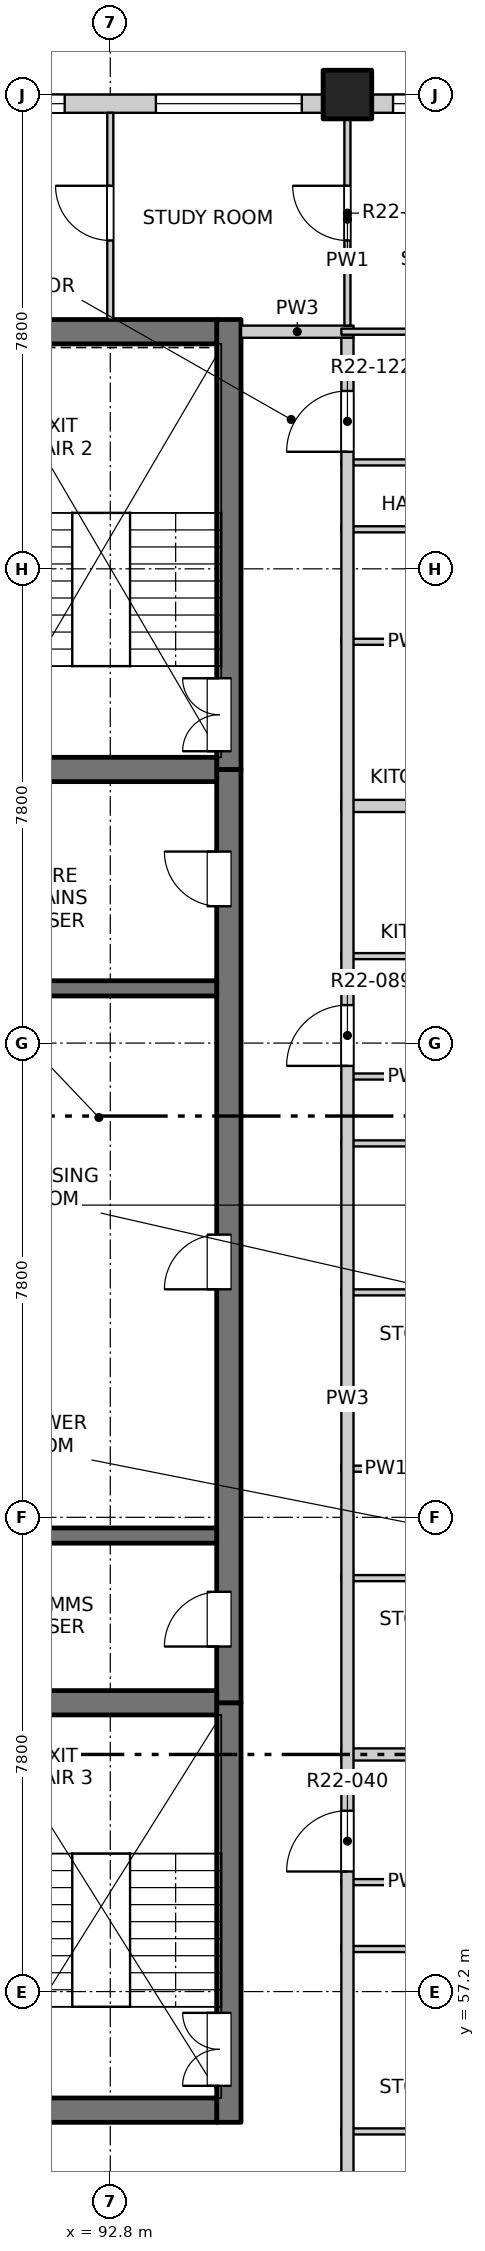
"""IFC4 building model, lengths in metres.
Left out: names, types, materials, properties, quantities, classifications, styles, units other than length and angle.
Written with IfcOpenShell. Run it as: python <this file> out.ifc"""

import sys

from ifc_helpers import new_model, si_unit, direction, frame, frame_2d, origin, origin_2d, place, context, subcontext, project, spatial, rectangle, extrude, element, fill, save


model = new_model("IFC4")
c1 = context("Model", 3, precision=1e-05, world=origin(), true_north=direction((0.0, 1.0)))
c2 = subcontext(c1, "Body", "Model", "MODEL_VIEW")
j1 = project(units=[si_unit("LENGTHUNIT", "METRE"), si_unit("PLANEANGLEUNIT", "RADIAN")], contexts=[c1])
p1 = place(None, origin())
s1 = spatial("IfcSite", under=j1, at=p1, CompositionType="ELEMENT")
p2 = place(p1, origin())
s2 = spatial("IfcBuilding", under=s1, at=p2, CompositionType="ELEMENT")
p3 = place(p2, frame((0.0, 0.0, 231.3)))
s3 = spatial("IfcBuildingStorey", under=s2, at=p3, CompositionType="ELEMENT", Elevation=231.3)
p4 = place(p3, frame((96.7, 88.4, -0.25), z_axis=(0.0, 0.0, 1.0), x_axis=(1.0, 0.0, 0.0)))
e1 = element("IfcColumn", 1, at=p4, inside=s3, PredefinedType="COLUMN", context=c2, shape_type="SweptSolid", body=[
    extrude(rectangle(XDim=0.8, YDim=0.8, at=origin_2d()), origin(), (0.0, 0.0, 1.0), 3.4),
])
p5 = place(p3, frame((94.75, 55.05, -0.25), z_axis=(0.0, 0.0, 1.0), x_axis=(0.0, 1.0, 0.0)))
e2 = element("IfcWall", 2, at=p5, inside=s3, PredefinedType="SOLIDWALL", context=c2, shape_type="SweptSolid", body=[
    extrude(rectangle(XDim=6.9, YDim=0.4, at=frame_2d((3.45, 0.0))), origin(), (0.0, 0.0, 1.0), 3.4),
])
p6 = place(p5, frame((0.6, 0.0, 0.25)))
e3 = element("IfcOpeningElement", 3, at=p6, cuts=e2, PredefinedType="OPENING", context=c2, shape_type="SweptSolid", body=[
    extrude(rectangle(XDim=1.2, YDim=2.1, at=frame_2d((0.6, 1.05))), frame((0.0, 0.21, 0.0), z_axis=(0.0, -1.0, 0.0), x_axis=(1.0, 0.0, 0.0)), (0.0, 0.0, 1.0), 0.42),
])
p7 = place(p3, frame((94.75, 61.95, -0.25), z_axis=(0.0, 0.0, 1.0), x_axis=(0.0, 1.0, 0.0)))
e4 = element("IfcWall", 4, at=p7, inside=s3, PredefinedType="SOLIDWALL", context=c2, shape_type="SweptSolid", body=[
    extrude(rectangle(XDim=15.35, YDim=0.4, at=frame_2d((7.675, 0.0))), origin(), (0.0, 0.0, 1.0), 3.4),
])
p8 = place(p7, frame((0.925, 0.0, 0.25)))
e5 = element("IfcOpeningElement", 5, at=p8, cuts=e4, PredefinedType="OPENING", context=c2, shape_type="SweptSolid", body=[
    extrude(rectangle(XDim=0.9, YDim=2.1, at=frame_2d((0.45, 1.05))), frame((0.0, 0.21, 0.0), z_axis=(0.0, -1.0, 0.0), x_axis=(1.0, 0.0, 0.0)), (0.0, 0.0, 1.0), 0.42),
])
p9 = place(p7, frame((6.8, 0.0, 0.25)))
e6 = element("IfcOpeningElement", 6, at=p9, cuts=e4, PredefinedType="OPENING", context=c2, shape_type="SweptSolid", body=[
    extrude(rectangle(XDim=0.9, YDim=2.1, at=frame_2d((0.45, 1.05))), frame((0.0, 0.21, 0.0), z_axis=(0.0, -1.0, 0.0), x_axis=(1.0, 0.0, 0.0)), (0.0, 0.0, 1.0), 0.42),
])
p10 = place(p7, frame((13.1, 0.0, 0.25)))
e7 = element("IfcOpeningElement", 7, at=p10, cuts=e4, PredefinedType="OPENING", context=c2, shape_type="SweptSolid", body=[
    extrude(rectangle(XDim=0.9, YDim=2.1, at=frame_2d((0.45, 1.05))), frame((0.0, 0.21, 0.0), z_axis=(0.0, -1.0, 0.0), x_axis=(1.0, 0.0, 0.0)), (0.0, 0.0, 1.0), 0.42),
])
p11 = place(p3, frame((94.75, 77.3, -0.25), z_axis=(0.0, 0.0, 1.0), x_axis=(0.0, 1.0, 0.0)))
e8 = element("IfcWall", 8, at=p11, inside=s3, PredefinedType="SOLIDWALL", context=c2, shape_type="SweptSolid", body=[
    extrude(rectangle(XDim=7.4, YDim=0.4, at=frame_2d((3.7, 0.0))), origin(), (0.0, 0.0, 1.0), 3.4),
])
p12 = place(p11, frame((0.3, 0.0, 0.25)))
e9 = element("IfcOpeningElement", 9, at=p12, cuts=e8, PredefinedType="OPENING", context=c2, shape_type="SweptSolid", body=[
    extrude(rectangle(XDim=1.2, YDim=2.1, at=frame_2d((0.6, 1.05))), frame((0.0, 0.21, 0.0), z_axis=(0.0, -1.0, 0.0), x_axis=(1.0, 0.0, 0.0)), (0.0, 0.0, 1.0), 0.42),
])
p13 = place(p3, frame((75.45, 55.25, -0.25), z_axis=(0.0, 0.0, 1.0), x_axis=(1.0, 0.0, 0.0)))
e10 = element("IfcWall", 10, at=p13, inside=s3, PredefinedType="SOLIDWALL", context=c2, shape_type="SweptSolid", body=[
    extrude(rectangle(XDim=19.1, YDim=0.4, at=frame_2d((9.55, 0.0))), origin(), (0.0, 0.0, 1.0), 3.4),
])
p14 = place(p13, frame((8.8, 0.0, 0.25)))
e11 = element("IfcOpeningElement", 11, at=p14, cuts=e10, PredefinedType="OPENING", context=c2, shape_type="SweptSolid", body=[
    extrude(rectangle(XDim=1.5, YDim=2.1, at=frame_2d((0.75, 1.05))), frame((0.0, 0.21, 0.0), z_axis=(0.0, -1.0, 0.0), x_axis=(1.0, 0.0, 0.0)), (0.0, 0.0, 1.0), 0.42),
])
p15 = place(p3, frame((75.45, 84.5, -0.25), z_axis=(0.0, 0.0, 1.0), x_axis=(1.0, 0.0, 0.0)))
e12 = element("IfcWall", 12, at=p15, inside=s3, PredefinedType="SOLIDWALL", context=c2, shape_type="SweptSolid", body=[
    extrude(rectangle(XDim=19.1, YDim=0.4, at=frame_2d((9.55, 0.0))), origin(), (0.0, 0.0, 1.0), 3.4),
])
p16 = place(p3, frame((90.675, 61.95, -0.25), z_axis=(0.0, 0.0, 1.0), x_axis=(1.0, 0.0, 0.0)))
e13 = element("IfcWall", 13, at=p16, inside=s3, PredefinedType="SOLIDWALL", context=c2, shape_type="SweptSolid", body=[
    extrude(rectangle(XDim=3.875, YDim=0.4, at=frame_2d((1.938, 0.0))), origin(), (0.0, 0.0, 1.0), 3.4),
])
for number, where, z_axis, x_axis in (
    (14, (90.675, 64.7, -0.25), (0.0, 0.0, 1.0), (1.0, 0.0, 0.0)),
    (15, (90.675, 73.7, -0.25), (0.0, 0.0, 1.0), (1.0, 0.0, 0.0)),
):
    element("IfcWall", number, at=place(p3, frame(where, z_axis=z_axis, x_axis=x_axis)), inside=s3, PredefinedType="SOLIDWALL", context=c2, shape_type="SweptSolid", body=[
        extrude(rectangle(XDim=3.875, YDim=0.25, at=frame_2d((1.938, 0.0))), origin(), (0.0, 0.0, 1.0), 3.4),
    ])
p17 = place(p3, frame((90.675, 77.3, -0.25), z_axis=(0.0, 0.0, 1.0), x_axis=(1.0, 0.0, 0.0)))
e16 = element("IfcWall", 16, at=p17, inside=s3, PredefinedType="SOLIDWALL", context=c2, shape_type="SweptSolid", body=[
    extrude(rectangle(XDim=3.875, YDim=0.4, at=frame_2d((1.938, 0.0))), origin(), (0.0, 0.0, 1.0), 3.4),
])
p18 = place(p3, frame((73.7, 88.25, 0.0), z_axis=(0.0, 0.0, 1.0), x_axis=(1.0, 0.0, 0.0)))
e17 = element("IfcWall", 17, at=p18, inside=s3, PredefinedType="SOLIDWALL", context=c2, shape_type="SweptSolid", body=[
    extrude(rectangle(XDim=22.6, YDim=0.3, at=frame_2d((11.3, 0.0))), origin(), (0.0, 0.0, 1.0), 2.7),
])
p19 = place(p18, frame((0.35, 0.0, 0.9)))
e18 = element("IfcOpeningElement", 18, at=p19, cuts=e17, PredefinedType="OPENING", context=c2, shape_type="SweptSolid", body=[
    extrude(rectangle(XDim=2.4, YDim=1.8, at=frame_2d((1.2, 0.9))), frame((0.0, 0.16, 0.0), z_axis=(0.0, -1.0, 0.0), x_axis=(1.0, 0.0, 0.0)), (0.0, 0.0, 1.0), 0.32),
])
p20 = place(p18, frame((4.25, 0.0, 0.9)))
e19 = element("IfcOpeningElement", 19, at=p20, cuts=e17, PredefinedType="OPENING", context=c2, shape_type="SweptSolid", body=[
    extrude(rectangle(XDim=2.4, YDim=1.8, at=frame_2d((1.2, 0.9))), frame((0.0, 0.16, 0.0), z_axis=(0.0, -1.0, 0.0), x_axis=(1.0, 0.0, 0.0)), (0.0, 0.0, 1.0), 0.32),
])
p21 = place(p18, frame((8.15, 0.0, 0.9)))
e20 = element("IfcOpeningElement", 20, at=p21, cuts=e17, PredefinedType="OPENING", context=c2, shape_type="SweptSolid", body=[
    extrude(rectangle(XDim=2.4, YDim=1.8, at=frame_2d((1.2, 0.9))), frame((0.0, 0.16, 0.0), z_axis=(0.0, -1.0, 0.0), x_axis=(1.0, 0.0, 0.0)), (0.0, 0.0, 1.0), 0.32),
])
p22 = place(p18, frame((12.05, 0.0, 0.9)))
e21 = element("IfcOpeningElement", 21, at=p22, cuts=e17, PredefinedType="OPENING", context=c2, shape_type="SweptSolid", body=[
    extrude(rectangle(XDim=2.4, YDim=1.8, at=frame_2d((1.2, 0.9))), frame((0.0, 0.16, 0.0), z_axis=(0.0, -1.0, 0.0), x_axis=(1.0, 0.0, 0.0)), (0.0, 0.0, 1.0), 0.32),
])
p23 = place(p18, frame((15.95, 0.0, 0.9)))
e22 = element("IfcOpeningElement", 22, at=p23, cuts=e17, PredefinedType="OPENING", context=c2, shape_type="SweptSolid", body=[
    extrude(rectangle(XDim=2.4, YDim=1.8, at=frame_2d((1.2, 0.9))), frame((0.0, 0.16, 0.0), z_axis=(0.0, -1.0, 0.0), x_axis=(1.0, 0.0, 0.0)), (0.0, 0.0, 1.0), 0.32),
])
p24 = place(p18, frame((19.85, 0.0, 0.9)))
e23 = element("IfcOpeningElement", 23, at=p24, cuts=e17, PredefinedType="OPENING", context=c2, shape_type="SweptSolid", body=[
    extrude(rectangle(XDim=2.4, YDim=1.8, at=frame_2d((1.2, 0.9))), frame((0.0, 0.16, 0.0), z_axis=(0.0, -1.0, 0.0), x_axis=(1.0, 0.0, 0.0)), (0.0, 0.0, 1.0), 0.32),
])
p25 = place(p3, frame((97.1, 88.25, 0.0), z_axis=(0.0, 0.0, 1.0), x_axis=(1.0, 0.0, 0.0)))
e24 = element("IfcWall", 24, at=p25, inside=s3, PredefinedType="SOLIDWALL", context=c2, shape_type="SweptSolid", body=[
    extrude(rectangle(XDim=7.4, YDim=0.3, at=frame_2d((3.7, 0.0))), origin(), (0.0, 0.0, 1.0), 2.7),
])
p26 = place(p25, frame((0.35, 0.0, 0.9)))
e25 = element("IfcOpeningElement", 25, at=p26, cuts=e24, PredefinedType="OPENING", context=c2, shape_type="SweptSolid", body=[
    extrude(rectangle(XDim=2.4, YDim=1.8, at=frame_2d((1.2, 0.9))), frame((0.0, 0.16, 0.0), z_axis=(0.0, -1.0, 0.0), x_axis=(1.0, 0.0, 0.0)), (0.0, 0.0, 1.0), 0.32),
])
p27 = place(p25, frame((4.25, 0.0, 0.9)))
e26 = element("IfcOpeningElement", 26, at=p27, cuts=e24, PredefinedType="OPENING", context=c2, shape_type="SweptSolid", body=[
    extrude(rectangle(XDim=2.4, YDim=1.8, at=frame_2d((1.2, 0.9))), frame((0.0, 0.16, 0.0), z_axis=(0.0, -1.0, 0.0), x_axis=(1.0, 0.0, 0.0)), (0.0, 0.0, 1.0), 0.32),
])
for number, where, z_axis, x_axis in (
    (27, (96.6, 54.9, 0.0), (0.0, 0.0, 1.0), (1.0, 0.0, 0.0)),
    (28, (96.6, 57.9, 0.0), (0.0, 0.0, 1.0), (1.0, 0.0, 0.0)),
    (29, (96.6, 59.0, 0.0), (0.0, 0.0, 1.0), (1.0, 0.0, 0.0)),
):
    element("IfcWall", number, at=place(p3, frame(where, z_axis=z_axis, x_axis=x_axis)), inside=s3, PredefinedType="PARTITIONING", context=c2, shape_type="SweptSolid", body=[
        extrude(rectangle(XDim=2.22, YDim=0.1, at=frame_2d((1.11, 0.0))), origin(), (0.0, 0.0, 1.0), 3.15),
    ])
p28 = place(p3, frame((96.6, 61.1, 0.0), z_axis=(0.0, 0.0, 1.0), x_axis=(1.0, 0.0, 0.0)))
e30 = element("IfcWall", 30, at=p28, inside=s3, PredefinedType="PARTITIONING", context=c2, shape_type="SweptSolid", body=[
    extrude(rectangle(XDim=11.5, YDim=0.2, at=frame_2d((5.75, 0.0))), origin(), (0.0, 0.0, 1.0), 2.55),
])
for number, where, z_axis, x_axis in (
    (31, (96.6, 64.0, 0.0), (0.0, 0.0, 1.0), (1.0, 0.0, 0.0)),
    (32, (96.6, 65.8, 0.0), (0.0, 0.0, 1.0), (1.0, 0.0, 0.0)),
):
    element("IfcWall", number, at=place(p3, frame(where, z_axis=z_axis, x_axis=x_axis)), inside=s3, PredefinedType="PARTITIONING", context=c2, shape_type="SweptSolid", body=[
        extrude(rectangle(XDim=2.22, YDim=0.1, at=frame_2d((1.11, 0.0))), origin(), (0.0, 0.0, 1.0), 3.15),
    ])
p29 = place(p3, frame((96.6, 68.7, 0.0), z_axis=(0.0, 0.0, 1.0), x_axis=(1.0, 0.0, 0.0)))
e33 = element("IfcWall", 33, at=p29, inside=s3, PredefinedType="PARTITIONING", context=c2, shape_type="SweptSolid", body=[
    extrude(rectangle(XDim=2.22, YDim=0.1, at=frame_2d((1.11, 0.0))), origin(), (0.0, 0.0, 1.0), 2.55),
])
for number, where, z_axis, x_axis in (
    (34, (96.6, 71.15, 0.0), (0.0, 0.0, 1.0), (1.0, 0.0, 0.0)),
    (35, (96.6, 72.25, 0.0), (0.0, 0.0, 1.0), (1.0, 0.0, 0.0)),
    (36, (96.6, 74.23, 0.0), (0.0, 0.0, 1.0), (1.0, 0.0, 0.0)),
):
    element("IfcWall", number, at=place(p3, frame(where, z_axis=z_axis, x_axis=x_axis)), inside=s3, PredefinedType="PARTITIONING", context=c2, shape_type="SweptSolid", body=[
        extrude(rectangle(XDim=2.22, YDim=0.1, at=frame_2d((1.11, 0.0))), origin(), (0.0, 0.0, 1.0), 3.15),
    ])
p30 = place(p3, frame((96.6, 76.7, 0.0), z_axis=(0.0, 0.0, 1.0), x_axis=(1.0, 0.0, 0.0)))
e37 = element("IfcWall", 37, at=p30, inside=s3, PredefinedType="PARTITIONING", context=c2, shape_type="SweptSolid", body=[
    extrude(rectangle(XDim=11.5, YDim=0.2, at=frame_2d((5.75, 0.0))), origin(), (0.0, 0.0, 1.0), 2.55),
])
for number, where, z_axis, x_axis in (
    (38, (96.6, 79.4, 0.0), (0.0, 0.0, 1.0), (1.0, 0.0, 0.0)),
    (39, (96.6, 81.25, 0.0), (0.0, 0.0, 1.0), (1.0, 0.0, 0.0)),
    (40, (96.6, 82.35, 0.0), (0.0, 0.0, 1.0), (1.0, 0.0, 0.0)),
):
    element("IfcWall", number, at=place(p3, frame(where, z_axis=z_axis, x_axis=x_axis)), inside=s3, PredefinedType="PARTITIONING", context=c2, shape_type="SweptSolid", body=[
        extrude(rectangle(XDim=2.22, YDim=0.1, at=frame_2d((1.11, 0.0))), origin(), (0.0, 0.0, 1.0), 3.15),
    ])
p31 = place(p3, frame((94.95, 84.5, 0.0), z_axis=(0.0, 0.0, 1.0), x_axis=(1.0, 0.0, 0.0)))
e41 = element("IfcWall", 41, at=p31, inside=s3, PredefinedType="PARTITIONING", context=c2, shape_type="SweptSolid", body=[
    extrude(rectangle(XDim=1.85, YDim=0.2, at=frame_2d((0.925, 0.0))), origin(), (0.0, 0.0, 1.0), 3.15),
])
p32 = place(p3, frame((96.6, 84.5, 0.0), z_axis=(0.0, 0.0, 1.0), x_axis=(1.0, 0.0, 0.0)))
e42 = element("IfcWall", 42, at=p32, inside=s3, PredefinedType="PARTITIONING", context=c2, shape_type="SweptSolid", body=[
    extrude(rectangle(XDim=11.5, YDim=0.1, at=frame_2d((5.75, 0.0))), origin(), (0.0, 0.0, 1.0), 3.15),
])
p33 = place(p32, frame((2.635, 0.0, 0.0)))
e43 = element("IfcOpeningElement", 43, at=p33, cuts=e42, PredefinedType="OPENING", context=c2, shape_type="SweptSolid", body=[
    extrude(rectangle(XDim=0.9, YDim=2.1, at=frame_2d((0.45, 1.05))), frame((0.0, 0.06, 0.0), z_axis=(0.0, -1.0, 0.0), x_axis=(1.0, 0.0, 0.0)), (0.0, 0.0, 1.0), 0.12),
])
p34 = place(p3, frame((92.8, 84.7, 0.0), z_axis=(0.0, 0.0, 1.0), x_axis=(0.0, 1.0, 0.0)))
e44 = element("IfcWall", 44, at=p34, inside=s3, PredefinedType="PARTITIONING", context=c2, shape_type="SweptSolid", body=[
    extrude(rectangle(XDim=3.4, YDim=0.1, at=frame_2d((1.7, 0.0))), origin(), (0.0, 0.0, 1.0), 3.15),
])
p35 = place(p34, frame((1.3, 0.0, 0.0)))
e45 = element("IfcOpeningElement", 45, at=p35, cuts=e44, PredefinedType="OPENING", context=c2, shape_type="SweptSolid", body=[
    extrude(rectangle(XDim=0.9, YDim=2.1, at=frame_2d((0.45, 1.05))), frame((0.0, 0.06, 0.0), z_axis=(0.0, -1.0, 0.0), x_axis=(1.0, 0.0, 0.0)), (0.0, 0.0, 1.0), 0.12),
])
p36 = place(p3, frame((96.7, 49.5, 0.0), z_axis=(0.0, 0.0, 1.0), x_axis=(0.0, 1.0, 0.0)))
e46 = element("IfcWall", 46, at=p36, inside=s3, PredefinedType="PARTITIONING", context=c2, shape_type="SweptSolid", body=[
    extrude(rectangle(XDim=34.9, YDim=0.2, at=frame_2d((17.45, 0.0))), origin(), (0.0, 0.0, 1.0), 3.15),
])
p37 = place(p36, frame((9.675, 0.0, 0.0)))
e47 = element("IfcOpeningElement", 47, at=p37, cuts=e46, PredefinedType="OPENING", context=c2, shape_type="SweptSolid", body=[
    extrude(rectangle(XDim=1.0, YDim=2.1, at=frame_2d((0.5, 1.05))), frame((0.0, 0.11, 0.0), z_axis=(0.0, -1.0, 0.0), x_axis=(1.0, 0.0, 0.0)), (0.0, 0.0, 1.0), 0.22),
])
p38 = place(p36, frame((22.925, 0.0, 0.0)))
e48 = element("IfcOpeningElement", 48, at=p38, cuts=e46, PredefinedType="OPENING", context=c2, shape_type="SweptSolid", body=[
    extrude(rectangle(XDim=1.0, YDim=2.1, at=frame_2d((0.5, 1.05))), frame((0.0, 0.11, 0.0), z_axis=(0.0, -1.0, 0.0), x_axis=(1.0, 0.0, 0.0)), (0.0, 0.0, 1.0), 0.22),
])
p39 = place(p36, frame((33.025, 0.0, 0.0)))
e49 = element("IfcOpeningElement", 49, at=p39, cuts=e46, PredefinedType="OPENING", context=c2, shape_type="SweptSolid", body=[
    extrude(rectangle(XDim=1.0, YDim=2.1, at=frame_2d((0.5, 1.05))), frame((0.0, 0.11, 0.0), z_axis=(0.0, -1.0, 0.0), x_axis=(1.0, 0.0, 0.0)), (0.0, 0.0, 1.0), 0.22),
])
p40 = place(p3, frame((96.7, 84.6, 0.0), z_axis=(0.0, 0.0, 1.0), x_axis=(0.0, 1.0, 0.0)))
e50 = element("IfcWall", 50, at=p40, inside=s3, PredefinedType="PARTITIONING", context=c2, shape_type="SweptSolid", body=[
    extrude(rectangle(XDim=3.5, YDim=0.1, at=frame_2d((1.75, 0.0))), origin(), (0.0, 0.0, 1.0), 3.15),
])
p41 = place(p40, frame((1.4, 0.0, 0.0)))
e51 = element("IfcOpeningElement", 51, at=p41, cuts=e50, PredefinedType="OPENING", context=c2, shape_type="SweptSolid", body=[
    extrude(rectangle(XDim=0.9, YDim=2.1, at=frame_2d((0.45, 1.05))), frame((0.0, 0.06, 0.0), z_axis=(0.0, -1.0, 0.0), x_axis=(1.0, 0.0, 0.0)), (0.0, 0.0, 1.0), 0.12),
])
p42 = place(p23, origin())
e52 = element("IfcWindow", 52, at=p42, inside=s3, PartitioningType="DOUBLE_PANEL_VERTICAL", PredefinedType="WINDOW", context=c2, shape_type="SweptSolid", body=[
    extrude(rectangle(XDim=2.4, YDim=1.8, at=frame_2d((1.2, 0.9))), frame((0.0, 0.03, 0.0), z_axis=(0.0, -1.0, 0.0), x_axis=(1.0, 0.0, 0.0)), (0.0, 0.0, 1.0), 0.06),
])
fill(e22, e52)
p43 = place(p24, origin())
e53 = element("IfcWindow", 53, at=p43, inside=s3, PartitioningType="DOUBLE_PANEL_VERTICAL", PredefinedType="WINDOW", context=c2, shape_type="SweptSolid", body=[
    extrude(rectangle(XDim=2.4, YDim=1.8, at=frame_2d((1.2, 0.9))), frame((0.0, 0.03, 0.0), z_axis=(0.0, -1.0, 0.0), x_axis=(1.0, 0.0, 0.0)), (0.0, 0.0, 1.0), 0.06),
])
fill(e23, e53)
p44 = place(p26, origin())
e54 = element("IfcWindow", 54, at=p44, inside=s3, PartitioningType="DOUBLE_PANEL_VERTICAL", PredefinedType="WINDOW", context=c2, shape_type="SweptSolid", body=[
    extrude(rectangle(XDim=2.4, YDim=1.8, at=frame_2d((1.2, 0.9))), frame((0.0, 0.03, 0.0), z_axis=(0.0, -1.0, 0.0), x_axis=(1.0, 0.0, 0.0)), (0.0, 0.0, 1.0), 0.06),
])
fill(e25, e54)
p45 = place(p6, origin())
e55 = element("IfcDoor", 55, at=p45, inside=s3, OperationType="DOUBLE_DOOR_SINGLE_SWING", PredefinedType="DOOR", context=c2, shape_type="SweptSolid", body=[
    extrude(rectangle(XDim=1.2, YDim=2.1, at=frame_2d((0.6, 1.05))), frame((0.0, 0.185, 0.0), z_axis=(0.0, -1.0, 0.0), x_axis=(1.0, 0.0, 0.0)), (0.0, 0.0, 1.0), 0.05),
])
fill(e3, e55)
p46 = place(p37, origin())
e56 = element("IfcDoor", 56, at=p46, inside=s3, OperationType="SINGLE_SWING_LEFT", PredefinedType="DOOR", context=c2, shape_type="SweptSolid", body=[
    extrude(rectangle(XDim=1.0, YDim=2.1, at=frame_2d((0.5, 1.05))), frame((0.0, 0.025, 0.0), z_axis=(0.0, -1.0, 0.0), x_axis=(1.0, 0.0, 0.0)), (0.0, 0.0, 1.0), 0.05),
])
fill(e47, e56)
p47 = place(p8, origin())
e57 = element("IfcDoor", 57, at=p47, inside=s3, OperationType="SINGLE_SWING_LEFT", PredefinedType="DOOR", context=c2, shape_type="SweptSolid", body=[
    extrude(rectangle(XDim=0.9, YDim=2.1, at=frame_2d((0.45, 1.05))), frame((0.0, 0.185, 0.0), z_axis=(0.0, -1.0, 0.0), x_axis=(1.0, 0.0, 0.0)), (0.0, 0.0, 1.0), 0.05),
])
fill(e5, e57)
p48 = place(p9, origin())
e58 = element("IfcDoor", 58, at=p48, inside=s3, OperationType="SINGLE_SWING_LEFT", PredefinedType="DOOR", context=c2, shape_type="SweptSolid", body=[
    extrude(rectangle(XDim=0.9, YDim=2.1, at=frame_2d((0.45, 1.05))), frame((0.0, 0.185, 0.0), z_axis=(0.0, -1.0, 0.0), x_axis=(1.0, 0.0, 0.0)), (0.0, 0.0, 1.0), 0.05),
])
fill(e6, e58)
p49 = place(p38, origin())
e59 = element("IfcDoor", 59, at=p49, inside=s3, OperationType="SINGLE_SWING_LEFT", PredefinedType="DOOR", context=c2, shape_type="SweptSolid", body=[
    extrude(rectangle(XDim=1.0, YDim=2.1, at=frame_2d((0.5, 1.05))), frame((0.0, 0.025, 0.0), z_axis=(0.0, -1.0, 0.0), x_axis=(1.0, 0.0, 0.0)), (0.0, 0.0, 1.0), 0.05),
])
fill(e48, e59)
p50 = place(p10, origin())
e60 = element("IfcDoor", 60, at=p50, inside=s3, OperationType="SINGLE_SWING_RIGHT", PredefinedType="DOOR", context=c2, shape_type="SweptSolid", body=[
    extrude(rectangle(XDim=0.9, YDim=2.1, at=frame_2d((0.45, 1.05))), frame((0.0, 0.185, 0.0), z_axis=(0.0, -1.0, 0.0), x_axis=(1.0, 0.0, 0.0)), (0.0, 0.0, 1.0), 0.05),
])
fill(e7, e60)
p51 = place(p12, origin())
e61 = element("IfcDoor", 61, at=p51, inside=s3, OperationType="DOUBLE_DOOR_SINGLE_SWING", PredefinedType="DOOR", context=c2, shape_type="SweptSolid", body=[
    extrude(rectangle(XDim=1.2, YDim=2.1, at=frame_2d((0.6, 1.05))), frame((0.0, 0.185, 0.0), z_axis=(0.0, -1.0, 0.0), x_axis=(1.0, 0.0, 0.0)), (0.0, 0.0, 1.0), 0.05),
])
fill(e9, e61)
p52 = place(p39, origin())
e62 = element("IfcDoor", 62, at=p52, inside=s3, OperationType="SINGLE_SWING_LEFT", PredefinedType="DOOR", context=c2, shape_type="SweptSolid", body=[
    extrude(rectangle(XDim=1.0, YDim=2.1, at=frame_2d((0.5, 1.05))), frame((0.0, 0.025, 0.0), z_axis=(0.0, -1.0, 0.0), x_axis=(1.0, 0.0, 0.0)), (0.0, 0.0, 1.0), 0.05),
])
fill(e49, e62)
p53 = place(p35, origin())
e63 = element("IfcDoor", 63, at=p53, inside=s3, OperationType="SINGLE_SWING_RIGHT", PredefinedType="DOOR", context=c2, shape_type="SweptSolid", body=[
    extrude(rectangle(XDim=0.9, YDim=2.1, at=frame_2d((0.45, 1.05))), frame((0.0, 0.025, 0.0), z_axis=(0.0, -1.0, 0.0), x_axis=(1.0, 0.0, 0.0)), (0.0, 0.0, 1.0), 0.05),
])
fill(e45, e63)
p54 = place(p41, origin())
e64 = element("IfcDoor", 64, at=p54, inside=s3, OperationType="SINGLE_SWING_RIGHT", PredefinedType="DOOR", context=c2, shape_type="SweptSolid", body=[
    extrude(rectangle(XDim=0.9, YDim=2.1, at=frame_2d((0.45, 1.05))), frame((0.0, 0.025, 0.0), z_axis=(0.0, -1.0, 0.0), x_axis=(1.0, 0.0, 0.0)), (0.0, 0.0, 1.0), 0.05),
])
fill(e51, e64)
save(model, sys.argv[1])
